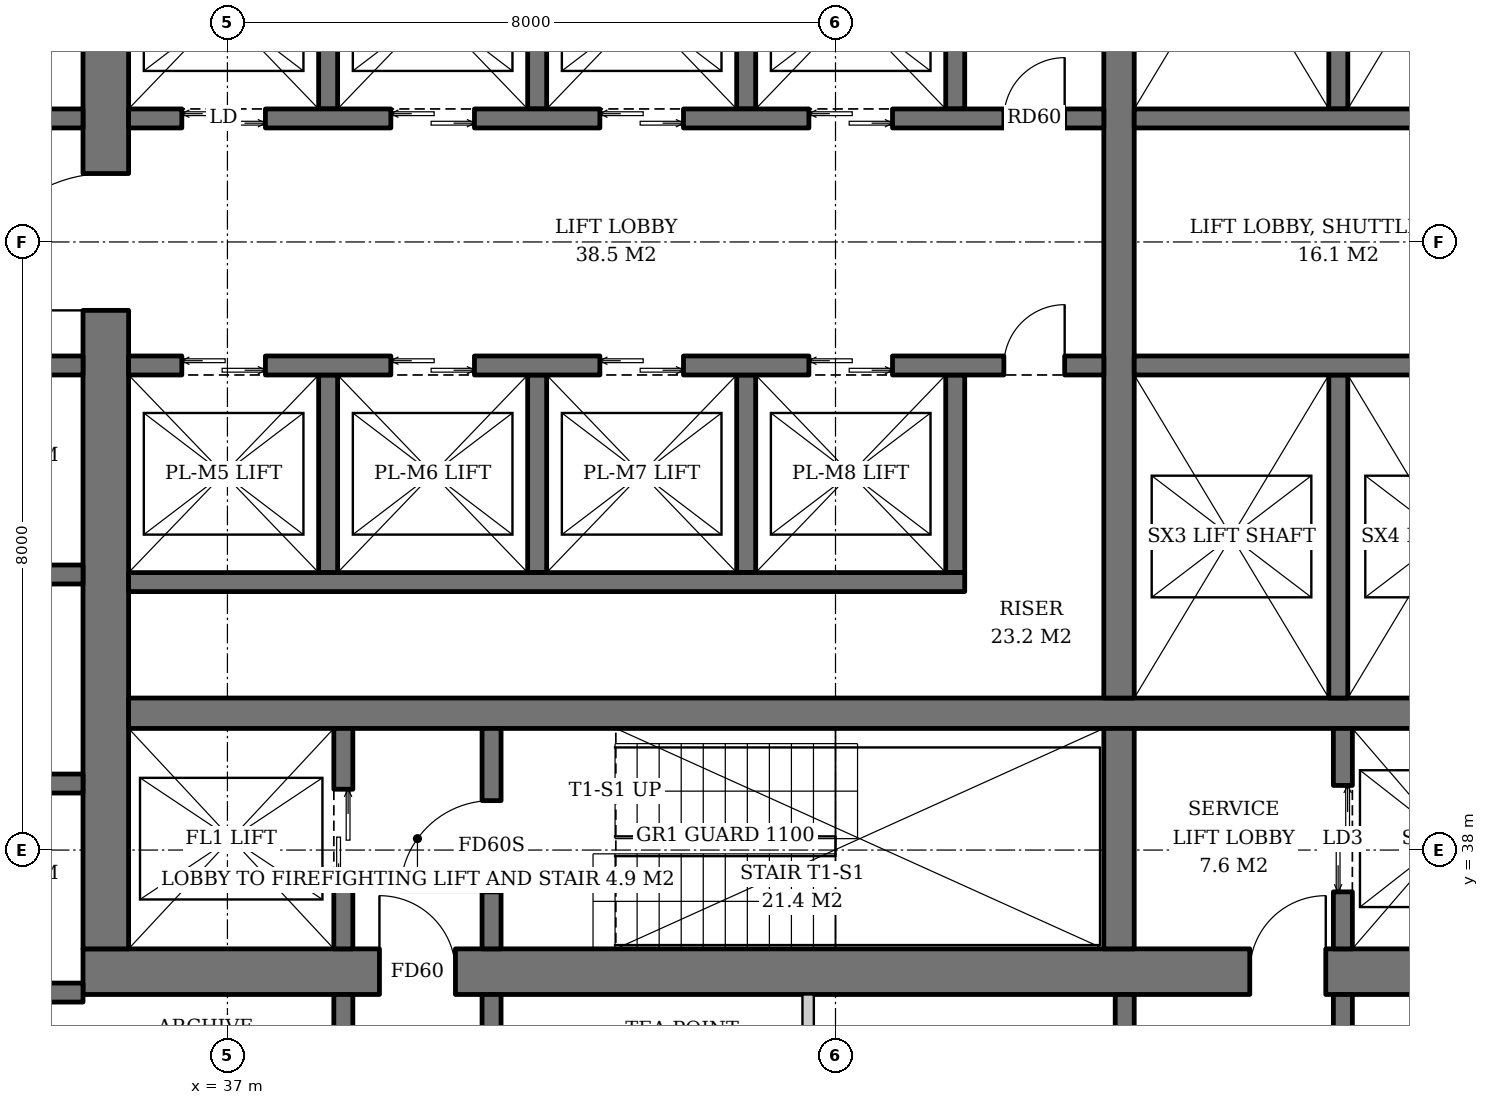
"""IFC4 building model, lengths in metres.
Left out: names, types, materials, properties, quantities, classifications, styles, units other than length and angle.
Written with IfcOpenShell. Run it as: python <this file> out.ifc"""

import sys

from ifc_helpers import new_model, si_unit, direction, frame, frame_2d, origin, place, context, subcontext, project, spatial, rectangle, extrude, element, fill, save


model = new_model("IFC4")
c1 = context("Model", 3, precision=1e-05, world=origin(), true_north=direction((0.0, 1.0)))
c2 = subcontext(c1, "Body", "Model", "MODEL_VIEW")
j1 = project(units=[si_unit("LENGTHUNIT", "METRE"), si_unit("PLANEANGLEUNIT", "RADIAN")], contexts=[c1])
p1 = place(None, origin())
s1 = spatial("IfcSite", under=j1, at=p1, CompositionType="ELEMENT")
p2 = place(p1, origin())
s2 = spatial("IfcBuilding", under=s1, at=p2, CompositionType="ELEMENT")
p3 = place(p2, frame((0.0, 0.0, 100.8)))
s3 = spatial("IfcBuildingStorey", under=s2, at=p3, CompositionType="ELEMENT", Elevation=100.8)
p4 = place(p3, frame((35.1, 36.4, 0.0), z_axis=(0.0, 0.0, 1.0), x_axis=(1.0, 0.0, 0.0)))
e1 = element("IfcWall", 1, at=p4, inside=s3, PredefinedType="SHEAR", context=c2, shape_type="SweptSolid", body=[
    extrude(rectangle(XDim=19.8, YDim=0.6, at=frame_2d((9.9, 0.0))), origin(), (0.0, 0.0, 1.0), 3.8),
])
p5 = place(p4, frame((3.9, 0.0, 0.0)))
e2 = element("IfcOpeningElement", 2, at=p5, cuts=e1, PredefinedType="OPENING", context=c2, shape_type="SweptSolid", body=[
    extrude(rectangle(XDim=1.0, YDim=2.1, at=frame_2d((0.5, 1.05))), frame((0.0, 0.31, 0.0), z_axis=(0.0, -1.0, 0.0), x_axis=(1.0, 0.0, 0.0)), (0.0, 0.0, 1.0), 0.62),
])
p6 = place(p4, frame((15.35, 0.0, 0.0)))
e3 = element("IfcOpeningElement", 3, at=p6, cuts=e1, PredefinedType="OPENING", context=c2, shape_type="SweptSolid", body=[
    extrude(rectangle(XDim=1.0, YDim=2.1, at=frame_2d((0.5, 1.05))), frame((0.0, 0.31, 0.0), z_axis=(0.0, -1.0, 0.0), x_axis=(1.0, 0.0, 0.0)), (0.0, 0.0, 1.0), 0.62),
])
p7 = place(p3, frame((35.4, 36.7, 0.0), z_axis=(0.0, 0.0, 1.0), x_axis=(0.0, 1.0, 0.0)))
e4 = element("IfcWall", 4, at=p7, inside=s3, PredefinedType="SHEAR", context=c2, shape_type="SweptSolid", body=[
    extrude(rectangle(XDim=18.6, YDim=0.6, at=frame_2d((9.3, 0.0))), origin(), (0.0, 0.0, 1.0), 3.8),
])
p8 = place(p7, frame((8.4, 0.0, 0.0)))
e5 = element("IfcOpeningElement", 5, at=p8, cuts=e4, PredefinedType="OPENING", context=c2, shape_type="SweptSolid", body=[
    extrude(rectangle(XDim=1.8, YDim=2.4, at=frame_2d((0.9, 1.2))), frame((0.0, 0.31, 0.0), z_axis=(0.0, -1.0, 0.0), x_axis=(1.0, 0.0, 0.0)), (0.0, 0.0, 1.0), 0.62),
])
p9 = place(p3, frame((35.7, 39.8, 0.0), z_axis=(0.0, 0.0, 1.0), x_axis=(1.0, 0.0, 0.0)))
e6 = element("IfcWall", 6, at=p9, inside=s3, PredefinedType="SHEAR", context=c2, shape_type="SweptSolid", body=[
    extrude(rectangle(XDim=18.6, YDim=0.4, at=frame_2d((9.3, 0.0))), origin(), (0.0, 0.0, 1.0), 3.8),
])
p10 = place(p3, frame((48.73, 36.7, 0.0), z_axis=(0.0, 0.0, 1.0), x_axis=(0.0, 1.0, 0.0)))
e7 = element("IfcWall", 7, at=p10, inside=s3, PredefinedType="SHEAR", context=c2, shape_type="SweptSolid", body=[
    extrude(rectangle(XDim=2.9, YDim=0.4, at=frame_2d((1.45, 0.0))), origin(), (0.0, 0.0, 1.0), 3.8),
])
p11 = place(p3, frame((48.73, 40.0, 0.0), z_axis=(0.0, 0.0, 1.0), x_axis=(0.0, 1.0, 0.0)))
e8 = element("IfcWall", 8, at=p11, inside=s3, PredefinedType="SHEAR", context=c2, shape_type="SweptSolid", body=[
    extrude(rectangle(XDim=12.0, YDim=0.4, at=frame_2d((6.0, 0.0))), origin(), (0.0, 0.0, 1.0), 3.8),
])
p12 = place(p3, frame((38.525, 36.7, 0.0), z_axis=(0.0, 0.0, 1.0), x_axis=(0.0, 1.0, 0.0)))
e9 = element("IfcWall", 9, at=p12, inside=s3, PredefinedType="SHEAR", context=c2, shape_type="SweptSolid", body=[
    extrude(rectangle(XDim=2.9, YDim=0.25, at=frame_2d((1.45, 0.0))), origin(), (0.0, 0.0, 1.0), 3.8),
])
p13 = place(p12, frame((0.8, 0.0, 0.0)))
e10 = element("IfcOpeningElement", 10, at=p13, cuts=e9, PredefinedType="OPENING", context=c2, shape_type="SweptSolid", body=[
    extrude(rectangle(XDim=1.3, YDim=2.2, at=frame_2d((0.65, 1.1))), frame((0.0, 0.135, 0.0), z_axis=(0.0, -1.0, 0.0), x_axis=(1.0, 0.0, 0.0)), (0.0, 0.0, 1.0), 0.27),
])
p14 = place(p3, frame((40.475, 36.7, 0.0), z_axis=(0.0, 0.0, 1.0), x_axis=(0.0, 1.0, 0.0)))
e11 = element("IfcWall", 11, at=p14, inside=s3, PredefinedType="SHEAR", context=c2, shape_type="SweptSolid", body=[
    extrude(rectangle(XDim=2.9, YDim=0.25, at=frame_2d((1.45, 0.0))), origin(), (0.0, 0.0, 1.0), 3.8),
])
p15 = place(p14, frame((0.75, 0.0, 0.0)))
e12 = element("IfcOpeningElement", 12, at=p15, cuts=e11, PredefinedType="OPENING", context=c2, shape_type="SweptSolid", body=[
    extrude(rectangle(XDim=1.2, YDim=2.1, at=frame_2d((0.6, 1.05))), frame((0.0, 0.135, 0.0), z_axis=(0.0, -1.0, 0.0), x_axis=(1.0, 0.0, 0.0)), (0.0, 0.0, 1.0), 0.27),
])
p16 = place(p3, frame((51.675, 36.7, 0.0), z_axis=(0.0, 0.0, 1.0), x_axis=(0.0, 1.0, 0.0)))
e13 = element("IfcWall", 13, at=p16, inside=s3, PredefinedType="SHEAR", context=c2, shape_type="SweptSolid", body=[
    extrude(rectangle(XDim=2.9, YDim=0.25, at=frame_2d((1.45, 0.0))), origin(), (0.0, 0.0, 1.0), 3.8),
])
p17 = place(p16, frame((0.75, 0.0, 0.0)))
e14 = element("IfcOpeningElement", 14, at=p17, cuts=e13, PredefinedType="OPENING", context=c2, shape_type="SweptSolid", body=[
    extrude(rectangle(XDim=1.4, YDim=2.4, at=frame_2d((0.7, 1.2))), frame((0.0, 0.135, 0.0), z_axis=(0.0, -1.0, 0.0), x_axis=(1.0, 0.0, 0.0)), (0.0, 0.0, 1.0), 0.27),
])
for number, where, z_axis, x_axis in (
    (15, (38.325, 47.75, 0.0), (0.0, 0.0, 1.0), (0.0, 1.0, 0.0)),
    (16, (41.075, 47.75, 0.0), (0.0, 0.0, 1.0), (0.0, 1.0, 0.0)),
    (17, (43.825, 47.75, 0.0), (0.0, 0.0, 1.0), (0.0, 1.0, 0.0)),
    (18, (46.575, 47.75, 0.0), (0.0, 0.0, 1.0), (0.0, 1.0, 0.0)),
):
    element("IfcWall", number, at=place(p3, frame(where, z_axis=z_axis, x_axis=x_axis)), inside=s3, PredefinedType="SHEAR", context=c2, shape_type="SweptSolid", body=[
        extrude(rectangle(XDim=2.6, YDim=0.25, at=frame_2d((1.3, 0.0))), origin(), (0.0, 0.0, 1.0), 3.8),
    ])
p18 = place(p3, frame((35.7, 47.625, 0.0), z_axis=(0.0, 0.0, 1.0), x_axis=(1.0, 0.0, 0.0)))
e19 = element("IfcWall", 19, at=p18, inside=s3, PredefinedType="SHEAR", context=c2, shape_type="SweptSolid", body=[
    extrude(rectangle(XDim=12.83, YDim=0.25, at=frame_2d((6.415, 0.0))), origin(), (0.0, 0.0, 1.0), 3.8),
])
p19 = place(p18, frame((0.7, 0.0, 0.0)))
e20 = element("IfcOpeningElement", 20, at=p19, cuts=e19, PredefinedType="OPENING", context=c2, shape_type="SweptSolid", body=[
    extrude(rectangle(XDim=1.1, YDim=2.2, at=frame_2d((0.55, 1.1))), frame((0.0, 0.135, 0.0), z_axis=(0.0, -1.0, 0.0), x_axis=(1.0, 0.0, 0.0)), (0.0, 0.0, 1.0), 0.27),
])
p20 = place(p18, frame((3.45, 0.0, 0.0)))
e21 = element("IfcOpeningElement", 21, at=p20, cuts=e19, PredefinedType="OPENING", context=c2, shape_type="SweptSolid", body=[
    extrude(rectangle(XDim=1.1, YDim=2.2, at=frame_2d((0.55, 1.1))), frame((0.0, 0.135, 0.0), z_axis=(0.0, -1.0, 0.0), x_axis=(1.0, 0.0, 0.0)), (0.0, 0.0, 1.0), 0.27),
])
p21 = place(p18, frame((6.2, 0.0, 0.0)))
e22 = element("IfcOpeningElement", 22, at=p21, cuts=e19, PredefinedType="OPENING", context=c2, shape_type="SweptSolid", body=[
    extrude(rectangle(XDim=1.1, YDim=2.2, at=frame_2d((0.55, 1.1))), frame((0.0, 0.135, 0.0), z_axis=(0.0, -1.0, 0.0), x_axis=(1.0, 0.0, 0.0)), (0.0, 0.0, 1.0), 0.27),
])
p22 = place(p18, frame((8.95, 0.0, 0.0)))
e23 = element("IfcOpeningElement", 23, at=p22, cuts=e19, PredefinedType="OPENING", context=c2, shape_type="SweptSolid", body=[
    extrude(rectangle(XDim=1.1, YDim=2.2, at=frame_2d((0.55, 1.1))), frame((0.0, 0.135, 0.0), z_axis=(0.0, -1.0, 0.0), x_axis=(1.0, 0.0, 0.0)), (0.0, 0.0, 1.0), 0.27),
])
p23 = place(p18, frame((11.515, 0.0, 0.0)))
e24 = element("IfcOpeningElement", 24, at=p23, cuts=e19, PredefinedType="OPENING", context=c2, shape_type="SweptSolid", body=[
    extrude(rectangle(XDim=0.8, YDim=2.0, at=frame_2d((0.4, 1.0))), frame((0.0, 0.135, 0.0), z_axis=(0.0, -1.0, 0.0), x_axis=(1.0, 0.0, 0.0)), (0.0, 0.0, 1.0), 0.27),
])
for number, where, z_axis, x_axis in (
    (25, (38.325, 44.25, 0.0), (0.0, 0.0, 1.0), (0.0, -1.0, 0.0)),
    (26, (41.075, 44.25, 0.0), (0.0, 0.0, 1.0), (0.0, -1.0, 0.0)),
    (27, (43.825, 44.25, 0.0), (0.0, 0.0, 1.0), (0.0, -1.0, 0.0)),
    (28, (46.575, 44.25, 0.0), (0.0, 0.0, 1.0), (0.0, -1.0, 0.0)),
):
    element("IfcWall", number, at=place(p3, frame(where, z_axis=z_axis, x_axis=x_axis)), inside=s3, PredefinedType="SHEAR", context=c2, shape_type="SweptSolid", body=[
        extrude(rectangle(XDim=2.6, YDim=0.25, at=frame_2d((1.3, 0.0))), origin(), (0.0, 0.0, 1.0), 3.8),
    ])
p24 = place(p3, frame((35.7, 41.525, 0.0), z_axis=(0.0, 0.0, 1.0), x_axis=(1.0, 0.0, 0.0)))
e29 = element("IfcWall", 29, at=p24, inside=s3, PredefinedType="SHEAR", context=c2, shape_type="SweptSolid", body=[
    extrude(rectangle(XDim=11.0, YDim=0.25, at=frame_2d((5.5, 0.0))), origin(), (0.0, 0.0, 1.0), 3.8),
])
p25 = place(p3, frame((35.7, 44.375, 0.0), z_axis=(0.0, 0.0, 1.0), x_axis=(1.0, 0.0, 0.0)))
e30 = element("IfcWall", 30, at=p25, inside=s3, PredefinedType="SHEAR", context=c2, shape_type="SweptSolid", body=[
    extrude(rectangle(XDim=12.83, YDim=0.25, at=frame_2d((6.415, 0.0))), origin(), (0.0, 0.0, 1.0), 3.8),
])
p26 = place(p25, frame((0.7, 0.0, 0.0)))
e31 = element("IfcOpeningElement", 31, at=p26, cuts=e30, PredefinedType="OPENING", context=c2, shape_type="SweptSolid", body=[
    extrude(rectangle(XDim=1.1, YDim=2.2, at=frame_2d((0.55, 1.1))), frame((0.0, 0.135, 0.0), z_axis=(0.0, -1.0, 0.0), x_axis=(1.0, 0.0, 0.0)), (0.0, 0.0, 1.0), 0.27),
])
p27 = place(p25, frame((3.45, 0.0, 0.0)))
e32 = element("IfcOpeningElement", 32, at=p27, cuts=e30, PredefinedType="OPENING", context=c2, shape_type="SweptSolid", body=[
    extrude(rectangle(XDim=1.1, YDim=2.2, at=frame_2d((0.55, 1.1))), frame((0.0, 0.135, 0.0), z_axis=(0.0, -1.0, 0.0), x_axis=(1.0, 0.0, 0.0)), (0.0, 0.0, 1.0), 0.27),
])
p28 = place(p25, frame((6.2, 0.0, 0.0)))
e33 = element("IfcOpeningElement", 33, at=p28, cuts=e30, PredefinedType="OPENING", context=c2, shape_type="SweptSolid", body=[
    extrude(rectangle(XDim=1.1, YDim=2.2, at=frame_2d((0.55, 1.1))), frame((0.0, 0.135, 0.0), z_axis=(0.0, -1.0, 0.0), x_axis=(1.0, 0.0, 0.0)), (0.0, 0.0, 1.0), 0.27),
])
p29 = place(p25, frame((8.95, 0.0, 0.0)))
e34 = element("IfcOpeningElement", 34, at=p29, cuts=e30, PredefinedType="OPENING", context=c2, shape_type="SweptSolid", body=[
    extrude(rectangle(XDim=1.1, YDim=2.2, at=frame_2d((0.55, 1.1))), frame((0.0, 0.135, 0.0), z_axis=(0.0, -1.0, 0.0), x_axis=(1.0, 0.0, 0.0)), (0.0, 0.0, 1.0), 0.27),
])
p30 = place(p25, frame((11.515, 0.0, 0.0)))
e35 = element("IfcOpeningElement", 35, at=p30, cuts=e30, PredefinedType="OPENING", context=c2, shape_type="SweptSolid", body=[
    extrude(rectangle(XDim=0.8, YDim=2.0, at=frame_2d((0.4, 1.0))), frame((0.0, 0.135, 0.0), z_axis=(0.0, -1.0, 0.0), x_axis=(1.0, 0.0, 0.0)), (0.0, 0.0, 1.0), 0.27),
])
p31 = place(p3, frame((51.615, 47.75, 0.0), z_axis=(0.0, 0.0, 1.0), x_axis=(0.0, 1.0, 0.0)))
e36 = element("IfcWall", 36, at=p31, inside=s3, PredefinedType="SHEAR", context=c2, shape_type="SweptSolid", body=[
    extrude(rectangle(XDim=4.25, YDim=0.25, at=frame_2d((2.125, 0.0))), origin(), (0.0, 0.0, 1.0), 3.8),
])
p32 = place(p3, frame((48.93, 47.625, 0.0), z_axis=(0.0, 0.0, 1.0), x_axis=(1.0, 0.0, 0.0)))
e37 = element("IfcWall", 37, at=p32, inside=s3, PredefinedType="SHEAR", context=c2, shape_type="SweptSolid", body=[
    extrude(rectangle(XDim=5.37, YDim=0.25, at=frame_2d((2.685, 0.0))), origin(), (0.0, 0.0, 1.0), 3.8),
])
p33 = place(p3, frame((51.615, 44.25, 0.0), z_axis=(0.0, 0.0, 1.0), x_axis=(0.0, -1.0, 0.0)))
e38 = element("IfcWall", 38, at=p33, inside=s3, PredefinedType="SHEAR", context=c2, shape_type="SweptSolid", body=[
    extrude(rectangle(XDim=4.25, YDim=0.25, at=frame_2d((2.125, 0.0))), origin(), (0.0, 0.0, 1.0), 3.8),
])
p34 = place(p3, frame((48.93, 44.375, 0.0), z_axis=(0.0, 0.0, 1.0), x_axis=(1.0, 0.0, 0.0)))
e39 = element("IfcWall", 39, at=p34, inside=s3, PredefinedType="SHEAR", context=c2, shape_type="SweptSolid", body=[
    extrude(rectangle(XDim=5.37, YDim=0.25, at=frame_2d((2.685, 0.0))), origin(), (0.0, 0.0, 1.0), 3.8),
])
for number, where, z_axis, x_axis in (
    (40, (32.4, 36.125, 0.0), (0.0, 0.0, 1.0), (1.0, 0.0, 0.0)),
    (41, (32.4, 38.875, 0.0), (0.0, 0.0, 1.0), (1.0, 0.0, 0.0)),
    (42, (32.4, 41.625, 0.0), (0.0, 0.0, 1.0), (1.0, 0.0, 0.0)),
    (43, (32.4, 44.375, 0.0), (0.0, 0.0, 1.0), (1.0, 0.0, 0.0)),
    (44, (32.4, 47.625, 0.0), (0.0, 0.0, 1.0), (1.0, 0.0, 0.0)),
):
    element("IfcWall", number, at=place(p3, frame(where, z_axis=z_axis, x_axis=x_axis)), inside=s3, PredefinedType="SHEAR", context=c2, shape_type="SweptSolid", body=[
        extrude(rectangle(XDim=2.7, YDim=0.25, at=frame_2d((1.35, 0.0))), origin(), (0.0, 0.0, 1.0), 3.8),
    ])
for number, where, z_axis, x_axis in (
    (45, (38.525, 33.4, 0.0), (0.0, 0.0, 1.0), (0.0, 1.0, 0.0)),
    (46, (40.475, 33.4, 0.0), (0.0, 0.0, 1.0), (0.0, 1.0, 0.0)),
    (47, (48.805, 33.4, 0.0), (0.0, 0.0, 1.0), (0.0, 1.0, 0.0)),
    (48, (51.675, 33.4, 0.0), (0.0, 0.0, 1.0), (0.0, 1.0, 0.0)),
):
    element("IfcWall", number, at=place(p3, frame(where, z_axis=z_axis, x_axis=x_axis)), inside=s3, PredefinedType="SOLIDWALL", context=c2, shape_type="SweptSolid", body=[
        extrude(rectangle(XDim=2.7, YDim=0.25, at=frame_2d((1.35, 0.0))), origin(), (0.0, 0.0, 1.0), 3.62),
    ])
p35 = place(p3, frame((44.64, 33.4, 0.0), z_axis=(0.0, 0.0, 1.0), x_axis=(0.0, 1.0, 0.0)))
e49 = element("IfcWall", 49, at=p35, inside=s3, PredefinedType="SOLIDWALL", context=c2, shape_type="SweptSolid", body=[
    extrude(rectangle(XDim=2.7, YDim=0.15, at=frame_2d((1.35, 0.0))), origin(), (0.0, 0.0, 1.0), 3.62),
])
p36 = place(p13, origin())
e50 = element("IfcDoor", 50, at=p36, inside=s3, OperationType="DOUBLE_DOOR_SLIDING", PredefinedType="DOOR", context=c2, shape_type="SweptSolid", body=[
    extrude(rectangle(XDim=1.3, YDim=2.2, at=frame_2d((0.65, 1.1))), frame((0.0, 0.025, 0.0), z_axis=(0.0, -1.0, 0.0), x_axis=(1.0, 0.0, 0.0)), (0.0, 0.0, 1.0), 0.05),
])
fill(e10, e50)
p37 = place(p15, origin())
e51 = element("IfcDoor", 51, at=p37, inside=s3, OperationType="SINGLE_SWING_LEFT", PredefinedType="DOOR", context=c2, shape_type="SweptSolid", body=[
    extrude(rectangle(XDim=1.2, YDim=2.1, at=frame_2d((0.6, 1.05))), frame((0.0, 0.025, 0.0), z_axis=(0.0, -1.0, 0.0), x_axis=(1.0, 0.0, 0.0)), (0.0, 0.0, 1.0), 0.05),
])
fill(e12, e51)
p38 = place(p17, origin())
e52 = element("IfcDoor", 52, at=p38, inside=s3, OperationType="DOUBLE_DOOR_SLIDING", PredefinedType="DOOR", context=c2, shape_type="SweptSolid", body=[
    extrude(rectangle(XDim=1.4, YDim=2.4, at=frame_2d((0.7, 1.2))), frame((0.0, 0.025, 0.0), z_axis=(0.0, -1.0, 0.0), x_axis=(1.0, 0.0, 0.0)), (0.0, 0.0, 1.0), 0.05),
])
fill(e14, e52)
p39 = place(p19, origin())
e53 = element("IfcDoor", 53, at=p39, inside=s3, OperationType="DOUBLE_DOOR_SLIDING", PredefinedType="DOOR", context=c2, shape_type="SweptSolid", body=[
    extrude(rectangle(XDim=1.1, YDim=2.2, at=frame_2d((0.55, 1.1))), frame((0.0, 0.025, 0.0), z_axis=(0.0, -1.0, 0.0), x_axis=(1.0, 0.0, 0.0)), (0.0, 0.0, 1.0), 0.05),
])
fill(e20, e53)
p40 = place(p20, origin())
e54 = element("IfcDoor", 54, at=p40, inside=s3, OperationType="DOUBLE_DOOR_SLIDING", PredefinedType="DOOR", context=c2, shape_type="SweptSolid", body=[
    extrude(rectangle(XDim=1.1, YDim=2.2, at=frame_2d((0.55, 1.1))), frame((0.0, 0.025, 0.0), z_axis=(0.0, -1.0, 0.0), x_axis=(1.0, 0.0, 0.0)), (0.0, 0.0, 1.0), 0.05),
])
fill(e21, e54)
p41 = place(p21, origin())
e55 = element("IfcDoor", 55, at=p41, inside=s3, OperationType="DOUBLE_DOOR_SLIDING", PredefinedType="DOOR", context=c2, shape_type="SweptSolid", body=[
    extrude(rectangle(XDim=1.1, YDim=2.2, at=frame_2d((0.55, 1.1))), frame((0.0, 0.025, 0.0), z_axis=(0.0, -1.0, 0.0), x_axis=(1.0, 0.0, 0.0)), (0.0, 0.0, 1.0), 0.05),
])
fill(e22, e55)
p42 = place(p22, origin())
e56 = element("IfcDoor", 56, at=p42, inside=s3, OperationType="DOUBLE_DOOR_SLIDING", PredefinedType="DOOR", context=c2, shape_type="SweptSolid", body=[
    extrude(rectangle(XDim=1.1, YDim=2.2, at=frame_2d((0.55, 1.1))), frame((0.0, 0.025, 0.0), z_axis=(0.0, -1.0, 0.0), x_axis=(1.0, 0.0, 0.0)), (0.0, 0.0, 1.0), 0.05),
])
fill(e23, e56)
p43 = place(p23, origin())
e57 = element("IfcDoor", 57, at=p43, inside=s3, OperationType="SINGLE_SWING_RIGHT", PredefinedType="DOOR", context=c2, shape_type="SweptSolid", body=[
    extrude(rectangle(XDim=0.8, YDim=2.0, at=frame_2d((0.4, 1.0))), frame((0.0, 0.025, 0.0), z_axis=(0.0, -1.0, 0.0), x_axis=(1.0, 0.0, 0.0)), (0.0, 0.0, 1.0), 0.05),
])
fill(e24, e57)
p44 = place(p26, origin())
e58 = element("IfcDoor", 58, at=p44, inside=s3, OperationType="DOUBLE_DOOR_SLIDING", PredefinedType="DOOR", context=c2, shape_type="SweptSolid", body=[
    extrude(rectangle(XDim=1.1, YDim=2.2, at=frame_2d((0.55, 1.1))), frame((0.0, 0.025, 0.0), z_axis=(0.0, -1.0, 0.0), x_axis=(1.0, 0.0, 0.0)), (0.0, 0.0, 1.0), 0.05),
])
fill(e31, e58)
p45 = place(p27, origin())
e59 = element("IfcDoor", 59, at=p45, inside=s3, OperationType="DOUBLE_DOOR_SLIDING", PredefinedType="DOOR", context=c2, shape_type="SweptSolid", body=[
    extrude(rectangle(XDim=1.1, YDim=2.2, at=frame_2d((0.55, 1.1))), frame((0.0, 0.025, 0.0), z_axis=(0.0, -1.0, 0.0), x_axis=(1.0, 0.0, 0.0)), (0.0, 0.0, 1.0), 0.05),
])
fill(e32, e59)
p46 = place(p28, origin())
e60 = element("IfcDoor", 60, at=p46, inside=s3, OperationType="DOUBLE_DOOR_SLIDING", PredefinedType="DOOR", context=c2, shape_type="SweptSolid", body=[
    extrude(rectangle(XDim=1.1, YDim=2.2, at=frame_2d((0.55, 1.1))), frame((0.0, 0.025, 0.0), z_axis=(0.0, -1.0, 0.0), x_axis=(1.0, 0.0, 0.0)), (0.0, 0.0, 1.0), 0.05),
])
fill(e33, e60)
p47 = place(p29, origin())
e61 = element("IfcDoor", 61, at=p47, inside=s3, OperationType="DOUBLE_DOOR_SLIDING", PredefinedType="DOOR", context=c2, shape_type="SweptSolid", body=[
    extrude(rectangle(XDim=1.1, YDim=2.2, at=frame_2d((0.55, 1.1))), frame((0.0, 0.025, 0.0), z_axis=(0.0, -1.0, 0.0), x_axis=(1.0, 0.0, 0.0)), (0.0, 0.0, 1.0), 0.05),
])
fill(e34, e61)
p48 = place(p30, origin())
e62 = element("IfcDoor", 62, at=p48, inside=s3, OperationType="SINGLE_SWING_RIGHT", PredefinedType="DOOR", context=c2, shape_type="SweptSolid", body=[
    extrude(rectangle(XDim=0.8, YDim=2.0, at=frame_2d((0.4, 1.0))), frame((0.0, 0.025, 0.0), z_axis=(0.0, -1.0, 0.0), x_axis=(1.0, 0.0, 0.0)), (0.0, 0.0, 1.0), 0.05),
])
fill(e35, e62)
p49 = place(p5, origin())
e63 = element("IfcDoor", 63, at=p49, inside=s3, OperationType="SINGLE_SWING_LEFT", PredefinedType="DOOR", context=c2, shape_type="SweptSolid", body=[
    extrude(rectangle(XDim=1.0, YDim=2.1, at=frame_2d((0.5, 1.05))), frame((0.0, 0.025, 0.0), z_axis=(0.0, -1.0, 0.0), x_axis=(1.0, 0.0, 0.0)), (0.0, 0.0, 1.0), 0.05),
])
fill(e2, e63)
p50 = place(p8, origin())
e64 = element("IfcDoor", 64, at=p50, inside=s3, OperationType="DOUBLE_DOOR_SINGLE_SWING", PredefinedType="DOOR", context=c2, shape_type="SweptSolid", body=[
    extrude(rectangle(XDim=1.8, YDim=2.4, at=frame_2d((0.9, 1.2))), frame((0.0, 0.025, 0.0), z_axis=(0.0, -1.0, 0.0), x_axis=(1.0, 0.0, 0.0)), (0.0, 0.0, 1.0), 0.05),
])
fill(e5, e64)
p51 = place(p6, origin())
e65 = element("IfcDoor", 65, at=p51, inside=s3, OperationType="SINGLE_SWING_RIGHT", PredefinedType="DOOR", context=c2, shape_type="SweptSolid", body=[
    extrude(rectangle(XDim=1.0, YDim=2.1, at=frame_2d((0.5, 1.05))), frame((0.0, 0.025, 0.0), z_axis=(0.0, -1.0, 0.0), x_axis=(1.0, 0.0, 0.0)), (0.0, 0.0, 1.0), 0.05),
])
fill(e3, e65)
save(model, sys.argv[1])
